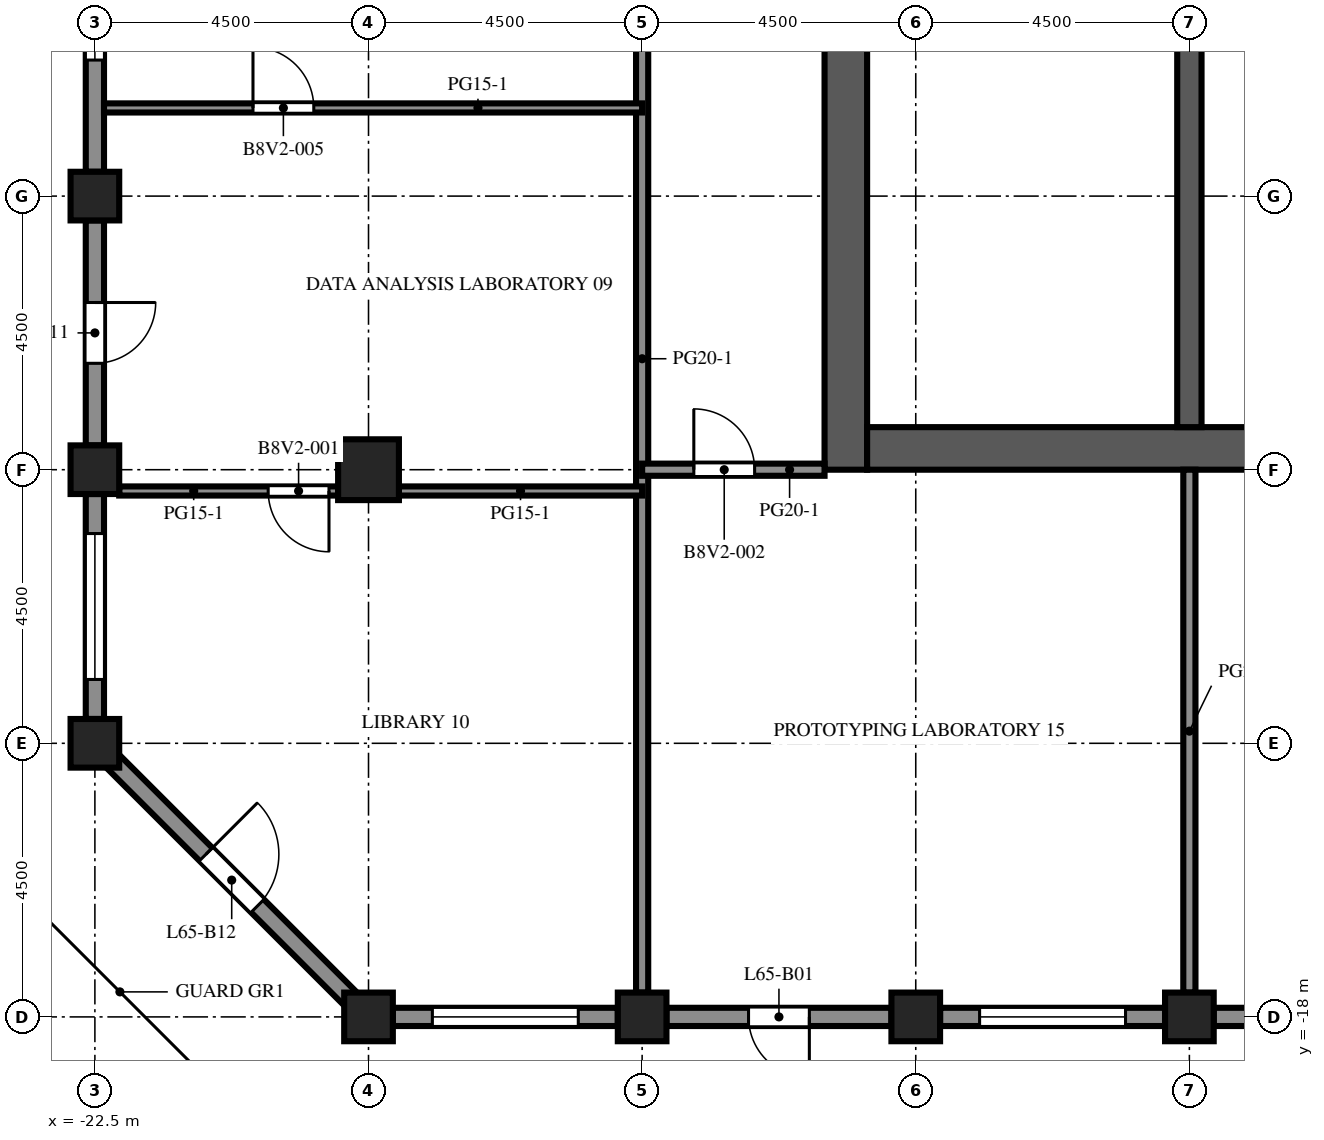
"""IFC4 building model, lengths in metres.
Left out: names, types, materials, properties, quantities, classifications, styles, units other than length and angle.
Written with IfcOpenShell. Run it as: python <this file> out.ifc"""

import sys

from ifc_helpers import new_model, si_unit, direction, frame, frame_2d, origin, origin_2d, place, context, subcontext, project, spatial, rectangle, extrude, element, fill, save


model = new_model("IFC4")
c1 = context("Model", 3, precision=1e-05, world=origin(), true_north=direction((0.0, 1.0)))
c2 = subcontext(c1, "Body", "Model", "MODEL_VIEW")
j1 = project(units=[si_unit("LENGTHUNIT", "METRE"), si_unit("PLANEANGLEUNIT", "RADIAN")], contexts=[c1])
p1 = place(None, origin())
s1 = spatial("IfcSite", under=j1, at=p1, CompositionType="ELEMENT")
p2 = place(p1, origin())
s2 = spatial("IfcBuilding", under=s1, at=p2, CompositionType="ELEMENT")
p3 = place(p2, frame((0.0, 0.0, 286.8)))
s3 = spatial("IfcBuildingStorey", under=s2, at=p3, CompositionType="ELEMENT", Elevation=286.8)
for number, where, z_axis, x_axis in (
    (1, (-22.5, -13.5, 0.0), (0.0, 0.0, 1.0), (1.0, 0.0, 0.0)),
    (2, (-22.5, -9.0, 0.0), (0.0, 0.0, 1.0), (1.0, 0.0, 0.0)),
    (3, (-22.5, -4.5, 0.0), (0.0, 0.0, 1.0), (1.0, 0.0, 0.0)),
    (4, (-18.0, -18.0, 0.0), (0.0, 0.0, 1.0), (1.0, 0.0, 0.0)),
    (5, (-13.5, -18.0, 0.0), (0.0, 0.0, 1.0), (1.0, 0.0, 0.0)),
    (6, (-9.0, -18.0, 0.0), (0.0, 0.0, 1.0), (1.0, 0.0, 0.0)),
    (7, (-4.5, -18.0, 0.0), (0.0, 0.0, 1.0), (1.0, 0.0, 0.0)),
):
    element("IfcColumn", number, at=place(p3, frame(where, z_axis=z_axis, x_axis=x_axis)), inside=s3, PredefinedType="COLUMN", context=c2, shape_type="SweptSolid", body=[
        extrude(rectangle(XDim=0.8, YDim=0.8, at=origin_2d()), origin(), (0.0, 0.0, 1.0), 4.1),
    ])
p4 = place(p3, frame((-18.0, -9.0, 0.0), z_axis=(0.0, 0.0, 1.0), x_axis=(1.0, 0.0, 0.0)))
e8 = element("IfcColumn", 8, at=p4, inside=s3, PredefinedType="COLUMN", context=c2, shape_type="SweptSolid", body=[
    extrude(rectangle(XDim=1.0, YDim=1.0, at=origin_2d()), origin(), (0.0, 0.0, 1.0), 4.1),
])
p5 = place(p3, frame((-10.15, -9.0, 0.0), z_axis=(0.0, 0.0, 1.0), x_axis=(0.0, 1.0, 0.0)))
e9 = element("IfcWall", 9, at=p5, inside=s3, PredefinedType="SHEAR", context=c2, shape_type="SweptSolid", body=[
    extrude(rectangle(XDim=27.5, YDim=0.7, at=frame_2d((13.75, 0.0))), origin(), (0.0, 0.0, 1.0), 4.1),
])
p6 = place(p5, frame((12.55, 0.0, 0.0)))
e10 = element("IfcOpeningElement", 10, at=p6, cuts=e9, PredefinedType="OPENING", context=c2, shape_type="SweptSolid", body=[
    extrude(rectangle(XDim=2.4, YDim=2.4, at=frame_2d((1.2, 1.2))), frame((0.0, 0.36, 0.0), z_axis=(0.0, -1.0, 0.0), x_axis=(1.0, 0.0, 0.0)), (0.0, 0.0, 1.0), 0.72),
])
p7 = place(p5, frame((6.825, 0.0, 0.0)))
e11 = element("IfcOpeningElement", 11, at=p7, cuts=e9, PredefinedType="OPENING", context=c2, shape_type="SweptSolid", body=[
    extrude(rectangle(XDim=1.2, YDim=2.1, at=frame_2d((0.6, 1.05))), frame((0.0, 0.36, 0.0), z_axis=(0.0, -1.0, 0.0), x_axis=(1.0, 0.0, 0.0)), (0.0, 0.0, 1.0), 0.72),
])
p8 = place(p5, frame((19.475, 0.0, 0.0)))
e12 = element("IfcOpeningElement", 12, at=p8, cuts=e9, PredefinedType="OPENING", context=c2, shape_type="SweptSolid", body=[
    extrude(rectangle(XDim=1.2, YDim=2.1, at=frame_2d((0.6, 1.05))), frame((0.0, 0.36, 0.0), z_axis=(0.0, -1.0, 0.0), x_axis=(1.0, 0.0, 0.0)), (0.0, 0.0, 1.0), 0.72),
])
p9 = place(p3, frame((-9.8, -8.65, 0.0), z_axis=(0.0, 0.0, 1.0), x_axis=(1.0, 0.0, 0.0)))
e13 = element("IfcWall", 13, at=p9, inside=s3, PredefinedType="SHEAR", context=c2, shape_type="SweptSolid", body=[
    extrude(rectangle(XDim=10.6, YDim=0.7, at=frame_2d((5.3, 0.0))), origin(), (0.0, 0.0, 1.0), 4.1),
])
p10 = place(p3, frame((-4.5, -8.3, 0.0), z_axis=(0.0, 0.0, 1.0), x_axis=(0.0, 1.0, 0.0)))
e14 = element("IfcWall", 14, at=p10, inside=s3, PredefinedType="SHEAR", context=c2, shape_type="SweptSolid", body=[
    extrude(rectangle(XDim=7.6, YDim=0.4, at=frame_2d((3.8, 0.0))), origin(), (0.0, 0.0, 1.0), 4.1),
])
p11 = place(p3, frame((-13.9, -18.0, 0.0), z_axis=(0.0, 0.0, 1.0), x_axis=(-1.0, 0.0, 0.0)))
e15 = element("IfcWall", 15, at=p11, inside=s3, PredefinedType="SOLIDWALL", context=c2, shape_type="SweptSolid", body=[
    extrude(rectangle(XDim=3.7, YDim=0.3, at=frame_2d((1.85, 0.0))), origin(), (0.0, 0.0, 1.0), 2.85),
])
p12 = place(p11, frame((0.65, 0.0, 0.8)))
e16 = element("IfcOpeningElement", 16, at=p12, cuts=e15, PredefinedType="OPENING", context=c2, shape_type="SweptSolid", body=[
    extrude(rectangle(XDim=2.4, YDim=1.7, at=frame_2d((1.2, 0.85))), frame((0.0, 0.16, 0.0), z_axis=(0.0, -1.0, 0.0), x_axis=(1.0, 0.0, 0.0)), (0.0, 0.0, 1.0), 0.32),
])
p13 = place(p3, frame((-9.4, -18.0, 0.0), z_axis=(0.0, 0.0, 1.0), x_axis=(-1.0, 0.0, 0.0)))
e17 = element("IfcWall", 17, at=p13, inside=s3, PredefinedType="SOLIDWALL", context=c2, shape_type="SweptSolid", body=[
    extrude(rectangle(XDim=3.7, YDim=0.3, at=frame_2d((1.85, 0.0))), origin(), (0.0, 0.0, 1.0), 2.85),
])
p14 = place(p13, frame((1.35, 0.0, 0.0)))
e18 = element("IfcOpeningElement", 18, at=p14, cuts=e17, PredefinedType="OPENING", context=c2, shape_type="SweptSolid", body=[
    extrude(rectangle(XDim=1.0, YDim=2.2, at=frame_2d((0.5, 1.1))), frame((0.0, 0.16, 0.0), z_axis=(0.0, -1.0, 0.0), x_axis=(1.0, 0.0, 0.0)), (0.0, 0.0, 1.0), 0.32),
])
p15 = place(p3, frame((-4.9, -18.0, 0.0), z_axis=(0.0, 0.0, 1.0), x_axis=(-1.0, 0.0, 0.0)))
e19 = element("IfcWall", 19, at=p15, inside=s3, PredefinedType="SOLIDWALL", context=c2, shape_type="SweptSolid", body=[
    extrude(rectangle(XDim=3.7, YDim=0.3, at=frame_2d((1.85, 0.0))), origin(), (0.0, 0.0, 1.0), 2.85),
])
p16 = place(p15, frame((0.65, 0.0, 0.8)))
e20 = element("IfcOpeningElement", 20, at=p16, cuts=e19, PredefinedType="OPENING", context=c2, shape_type="SweptSolid", body=[
    extrude(rectangle(XDim=2.4, YDim=1.7, at=frame_2d((1.2, 0.85))), frame((0.0, 0.16, 0.0), z_axis=(0.0, -1.0, 0.0), x_axis=(1.0, 0.0, 0.0)), (0.0, 0.0, 1.0), 0.32),
])
p17 = place(p3, frame((-0.4, -18.0, 0.0), z_axis=(0.0, 0.0, 1.0), x_axis=(-1.0, 0.0, 0.0)))
e21 = element("IfcWall", 21, at=p17, inside=s3, PredefinedType="SOLIDWALL", context=c2, shape_type="SweptSolid", body=[
    extrude(rectangle(XDim=3.7, YDim=0.3, at=frame_2d((1.85, 0.0))), origin(), (0.0, 0.0, 1.0), 2.85),
])
p18 = place(p17, frame((0.65, 0.0, 0.8)))
e22 = element("IfcOpeningElement", 22, at=p18, cuts=e21, PredefinedType="OPENING", context=c2, shape_type="SweptSolid", body=[
    extrude(rectangle(XDim=2.4, YDim=1.7, at=frame_2d((1.2, 0.85))), frame((0.0, 0.16, 0.0), z_axis=(0.0, -1.0, 0.0), x_axis=(1.0, 0.0, 0.0)), (0.0, 0.0, 1.0), 0.32),
])
p19 = place(p3, frame((-22.5, -4.1, 0.0), z_axis=(0.0, 0.0, 1.0), x_axis=(0.0, 1.0, 0.0)))
e23 = element("IfcWall", 23, at=p19, inside=s3, PredefinedType="SOLIDWALL", context=c2, shape_type="SweptSolid", body=[
    extrude(rectangle(XDim=3.7, YDim=0.3, at=frame_2d((1.85, 0.0))), origin(), (0.0, 0.0, 1.0), 2.85),
])
p20 = place(p19, frame((1.837, 0.0, 0.8)))
e24 = element("IfcOpeningElement", 24, at=p20, cuts=e23, PredefinedType="OPENING", context=c2, shape_type="SweptSolid", body=[
    extrude(rectangle(XDim=1.2, YDim=1.7, at=frame_2d((0.6, 0.85))), frame((0.0, 0.16, 0.0), z_axis=(0.0, -1.0, 0.0), x_axis=(1.0, 0.0, 0.0)), (0.0, 0.0, 1.0), 0.32),
])
p21 = place(p3, frame((-22.5, -8.6, 0.0), z_axis=(0.0, 0.0, 1.0), x_axis=(0.0, 1.0, 0.0)))
e25 = element("IfcWall", 25, at=p21, inside=s3, PredefinedType="SOLIDWALL", context=c2, shape_type="SweptSolid", body=[
    extrude(rectangle(XDim=3.7, YDim=0.3, at=frame_2d((1.85, 0.0))), origin(), (0.0, 0.0, 1.0), 2.85),
])
p22 = place(p21, frame((1.35, 0.0, 0.0)))
e26 = element("IfcOpeningElement", 26, at=p22, cuts=e25, PredefinedType="OPENING", context=c2, shape_type="SweptSolid", body=[
    extrude(rectangle(XDim=1.0, YDim=2.2, at=frame_2d((0.5, 1.1))), frame((0.0, 0.16, 0.0), z_axis=(0.0, -1.0, 0.0), x_axis=(1.0, 0.0, 0.0)), (0.0, 0.0, 1.0), 0.32),
])
p23 = place(p3, frame((-22.5, -13.1, 0.0), z_axis=(0.0, 0.0, 1.0), x_axis=(0.0, 1.0, 0.0)))
e27 = element("IfcWall", 27, at=p23, inside=s3, PredefinedType="SOLIDWALL", context=c2, shape_type="SweptSolid", body=[
    extrude(rectangle(XDim=3.7, YDim=0.3, at=frame_2d((1.85, 0.0))), origin(), (0.0, 0.0, 1.0), 2.85),
])
p24 = place(p23, frame((0.65, 0.0, 0.8)))
e28 = element("IfcOpeningElement", 28, at=p24, cuts=e27, PredefinedType="OPENING", context=c2, shape_type="SweptSolid", body=[
    extrude(rectangle(XDim=2.4, YDim=1.7, at=frame_2d((1.2, 0.85))), frame((0.0, 0.16, 0.0), z_axis=(0.0, -1.0, 0.0), x_axis=(1.0, 0.0, 0.0)), (0.0, 0.0, 1.0), 0.32),
])
p25 = place(p3, frame((-18.294, -17.706, 0.0), z_axis=(0.0, 0.0, 1.0), x_axis=(-0.707106781187, 0.707106781187, 0.0)))
e29 = element("IfcWall", 29, at=p25, inside=s3, PredefinedType="SOLIDWALL", context=c2, shape_type="SweptSolid", body=[
    extrude(rectangle(XDim=5.532, YDim=0.3, at=frame_2d((2.766, 0.0))), origin(), (0.0, 0.0, 1.0), 2.85),
])
p26 = place(p25, frame((2.166, 0.0, 0.0)))
e30 = element("IfcOpeningElement", 30, at=p26, cuts=e29, PredefinedType="OPENING", context=c2, shape_type="SweptSolid", body=[
    extrude(rectangle(XDim=1.2, YDim=2.2, at=frame_2d((0.6, 1.1))), frame((0.0, 0.16, 0.0), z_axis=(0.0, -1.0, 0.0), x_axis=(1.0, 0.0, 0.0)), (0.0, 0.0, 1.0), 0.32),
])
for number, where, z_axis, x_axis in (
    (31, (-4.3, -6.02, 0.0), (0.0, 0.0, 1.0), (1.0, 0.0, 0.0)),
    (32, (-4.3, -3.74, 0.0), (0.0, 0.0, 1.0), (1.0, 0.0, 0.0)),
):
    element("IfcWall", number, at=place(p3, frame(where, z_axis=z_axis, x_axis=x_axis)), inside=s3, PredefinedType="PARTITIONING", context=c2, shape_type="SweptSolid", body=[
        extrude(rectangle(XDim=3.6, YDim=0.1, at=frame_2d((1.8, 0.0))), origin(), (0.0, 0.0, 1.0), 3.65),
    ])
p27 = place(p3, frame((-13.5, -17.6, 0.0), z_axis=(0.0, 0.0, 1.0), x_axis=(0.0, 1.0, 0.0)))
e33 = element("IfcWall", 33, at=p27, inside=s3, PredefinedType="PARTITIONING", context=c2, shape_type="SweptSolid", body=[
    extrude(rectangle(XDim=20.85, YDim=0.2, at=frame_2d((10.425, 0.0))), origin(), (0.0, 0.0, 1.0), 3.65),
])
p28 = place(p3, frame((-4.5, -17.6, 0.0), z_axis=(0.0, 0.0, 1.0), x_axis=(0.0, 1.0, 0.0)))
e34 = element("IfcWall", 34, at=p28, inside=s3, PredefinedType="PARTITIONING", context=c2, shape_type="SweptSolid", body=[
    extrude(rectangle(XDim=8.6, YDim=0.2, at=frame_2d((4.3, 0.0))), origin(), (0.0, 0.0, 1.0), 3.65),
])
p29 = place(p3, frame((-18.5, -9.35, 0.0), z_axis=(0.0, 0.0, 1.0), x_axis=(-1.0, 0.0, 0.0)))
e35 = element("IfcWall", 35, at=p29, inside=s3, PredefinedType="PARTITIONING", context=c2, shape_type="SweptSolid", body=[
    extrude(rectangle(XDim=3.6, YDim=0.15, at=frame_2d((1.8, 0.0))), origin(), (0.0, 0.0, 1.0), 3.65),
])
p30 = place(p29, frame((0.15, 0.0, 0.0)))
e36 = element("IfcOpeningElement", 36, at=p30, cuts=e35, PredefinedType="OPENING", context=c2, shape_type="SweptSolid", body=[
    extrude(rectangle(XDim=1.0, YDim=2.1, at=frame_2d((0.5, 1.05))), frame((0.0, 0.085, 0.0), z_axis=(0.0, -1.0, 0.0), x_axis=(1.0, 0.0, 0.0)), (0.0, 0.0, 1.0), 0.17),
])
p31 = place(p3, frame((-17.5, -9.35, 0.0), z_axis=(0.0, 0.0, 1.0), x_axis=(1.0, 0.0, 0.0)))
e37 = element("IfcWall", 37, at=p31, inside=s3, PredefinedType="PARTITIONING", context=c2, shape_type="SweptSolid", body=[
    extrude(rectangle(XDim=4.0, YDim=0.15, at=frame_2d((2.0, 0.0))), origin(), (0.0, 0.0, 1.0), 3.65),
])
p32 = place(p3, frame((-10.5, -9.0, 0.0), z_axis=(0.0, 0.0, 1.0), x_axis=(-1.0, 0.0, 0.0)))
e38 = element("IfcWall", 38, at=p32, inside=s3, PredefinedType="PARTITIONING", context=c2, shape_type="SweptSolid", body=[
    extrude(rectangle(XDim=3.0, YDim=0.2, at=frame_2d((1.5, 0.0))), origin(), (0.0, 0.0, 1.0), 3.65),
])
p33 = place(p32, frame((1.15, 0.0, 0.0)))
e39 = element("IfcOpeningElement", 39, at=p33, cuts=e38, PredefinedType="OPENING", context=c2, shape_type="SweptSolid", body=[
    extrude(rectangle(XDim=1.0, YDim=2.1, at=frame_2d((0.5, 1.05))), frame((0.0, 0.11, 0.0), z_axis=(0.0, -1.0, 0.0), x_axis=(1.0, 0.0, 0.0)), (0.0, 0.0, 1.0), 0.22),
])
p34 = place(p3, frame((-13.5, -3.05, 0.0), z_axis=(0.0, 0.0, 1.0), x_axis=(-1.0, 0.0, 0.0)))
e40 = element("IfcWall", 40, at=p34, inside=s3, PredefinedType="PARTITIONING", context=c2, shape_type="SweptSolid", body=[
    extrude(rectangle(XDim=8.85, YDim=0.15, at=frame_2d((4.425, 0.0))), origin(), (0.0, 0.0, 1.0), 3.65),
])
p35 = place(p34, frame((5.4, 0.0, 0.0)))
e41 = element("IfcOpeningElement", 41, at=p35, cuts=e40, PredefinedType="OPENING", context=c2, shape_type="SweptSolid", body=[
    extrude(rectangle(XDim=1.0, YDim=2.1, at=frame_2d((0.5, 1.05))), frame((0.0, 0.085, 0.0), z_axis=(0.0, -1.0, 0.0), x_axis=(1.0, 0.0, 0.0)), (0.0, 0.0, 1.0), 0.17),
])
p36 = place(p12, origin())
e42 = element("IfcWindow", 42, at=p36, inside=s3, PartitioningType="SINGLE_PANEL", PredefinedType="WINDOW", context=c2, shape_type="SweptSolid", body=[
    extrude(rectangle(XDim=2.4, YDim=1.7, at=frame_2d((1.2, 0.85))), frame((0.0, 0.03, 0.0), z_axis=(0.0, -1.0, 0.0), x_axis=(1.0, 0.0, 0.0)), (0.0, 0.0, 1.0), 0.06),
])
fill(e16, e42)
p37 = place(p14, origin())
e43 = element("IfcDoor", 43, at=p37, inside=s3, OperationType="SINGLE_SWING_LEFT", PredefinedType="DOOR", context=c2, shape_type="SweptSolid", body=[
    extrude(rectangle(XDim=1.0, YDim=2.2, at=frame_2d((0.5, 1.1))), frame((0.0, 0.025, 0.0), z_axis=(0.0, -1.0, 0.0), x_axis=(1.0, 0.0, 0.0)), (0.0, 0.0, 1.0), 0.05),
])
fill(e18, e43)
p38 = place(p16, origin())
e44 = element("IfcWindow", 44, at=p38, inside=s3, PartitioningType="SINGLE_PANEL", PredefinedType="WINDOW", context=c2, shape_type="SweptSolid", body=[
    extrude(rectangle(XDim=2.4, YDim=1.7, at=frame_2d((1.2, 0.85))), frame((0.0, 0.03, 0.0), z_axis=(0.0, -1.0, 0.0), x_axis=(1.0, 0.0, 0.0)), (0.0, 0.0, 1.0), 0.06),
])
fill(e20, e44)
p39 = place(p20, origin())
e45 = element("IfcWindow", 45, at=p39, inside=s3, PartitioningType="SINGLE_PANEL", PredefinedType="WINDOW", context=c2, shape_type="SweptSolid", body=[
    extrude(rectangle(XDim=1.2, YDim=1.7, at=frame_2d((0.6, 0.85))), frame((0.0, 0.03, 0.0), z_axis=(0.0, -1.0, 0.0), x_axis=(1.0, 0.0, 0.0)), (0.0, 0.0, 1.0), 0.06),
])
fill(e24, e45)
p40 = place(p22, origin())
e46 = element("IfcDoor", 46, at=p40, inside=s3, OperationType="SINGLE_SWING_RIGHT", PredefinedType="DOOR", context=c2, shape_type="SweptSolid", body=[
    extrude(rectangle(XDim=1.0, YDim=2.2, at=frame_2d((0.5, 1.1))), frame((0.0, 0.025, 0.0), z_axis=(0.0, -1.0, 0.0), x_axis=(1.0, 0.0, 0.0)), (0.0, 0.0, 1.0), 0.05),
])
fill(e26, e46)
p41 = place(p24, origin())
e47 = element("IfcWindow", 47, at=p41, inside=s3, PartitioningType="SINGLE_PANEL", PredefinedType="WINDOW", context=c2, shape_type="SweptSolid", body=[
    extrude(rectangle(XDim=2.4, YDim=1.7, at=frame_2d((1.2, 0.85))), frame((0.0, 0.03, 0.0), z_axis=(0.0, -1.0, 0.0), x_axis=(1.0, 0.0, 0.0)), (0.0, 0.0, 1.0), 0.06),
])
fill(e28, e47)
p42 = place(p26, origin())
e48 = element("IfcDoor", 48, at=p42, inside=s3, OperationType="SINGLE_SWING_RIGHT", PredefinedType="DOOR", context=c2, shape_type="SweptSolid", body=[
    extrude(rectangle(XDim=1.2, YDim=2.2, at=frame_2d((0.6, 1.1))), frame((0.0, 0.025, 0.0), z_axis=(0.0, -1.0, 0.0), x_axis=(1.0, 0.0, 0.0)), (0.0, 0.0, 1.0), 0.05),
])
fill(e30, e48)
p43 = place(p7, origin())
e49 = element("IfcDoor", 49, at=p43, inside=s3, OperationType="SINGLE_SWING_LEFT", PredefinedType="DOOR", context=c2, shape_type="SweptSolid", body=[
    extrude(rectangle(XDim=1.2, YDim=2.1, at=frame_2d((0.6, 1.05))), frame((0.0, 0.025, 0.0), z_axis=(0.0, -1.0, 0.0), x_axis=(1.0, 0.0, 0.0)), (0.0, 0.0, 1.0), 0.05),
])
fill(e11, e49)
p44 = place(p30, origin())
e50 = element("IfcDoor", 50, at=p44, inside=s3, OperationType="SINGLE_SWING_LEFT", PredefinedType="DOOR", context=c2, shape_type="SweptSolid", body=[
    extrude(rectangle(XDim=1.0, YDim=2.1, at=frame_2d((0.5, 1.05))), frame((0.0, 0.025, 0.0), z_axis=(0.0, -1.0, 0.0), x_axis=(1.0, 0.0, 0.0)), (0.0, 0.0, 1.0), 0.05),
])
fill(e36, e50)
p45 = place(p33, origin())
e51 = element("IfcDoor", 51, at=p45, inside=s3, OperationType="SINGLE_SWING_RIGHT", PredefinedType="DOOR", context=c2, shape_type="SweptSolid", body=[
    extrude(rectangle(XDim=1.0, YDim=2.1, at=frame_2d((0.5, 1.05))), frame((0.0, 0.025, 0.0), z_axis=(0.0, -1.0, 0.0), x_axis=(1.0, 0.0, 0.0)), (0.0, 0.0, 1.0), 0.05),
])
fill(e39, e51)
p46 = place(p35, origin())
e52 = element("IfcDoor", 52, at=p46, inside=s3, OperationType="SINGLE_SWING_RIGHT", PredefinedType="DOOR", context=c2, shape_type="SweptSolid", body=[
    extrude(rectangle(XDim=1.0, YDim=2.1, at=frame_2d((0.5, 1.05))), frame((0.0, 0.025, 0.0), z_axis=(0.0, -1.0, 0.0), x_axis=(1.0, 0.0, 0.0)), (0.0, 0.0, 1.0), 0.05),
])
fill(e41, e52)
save(model, sys.argv[1])
